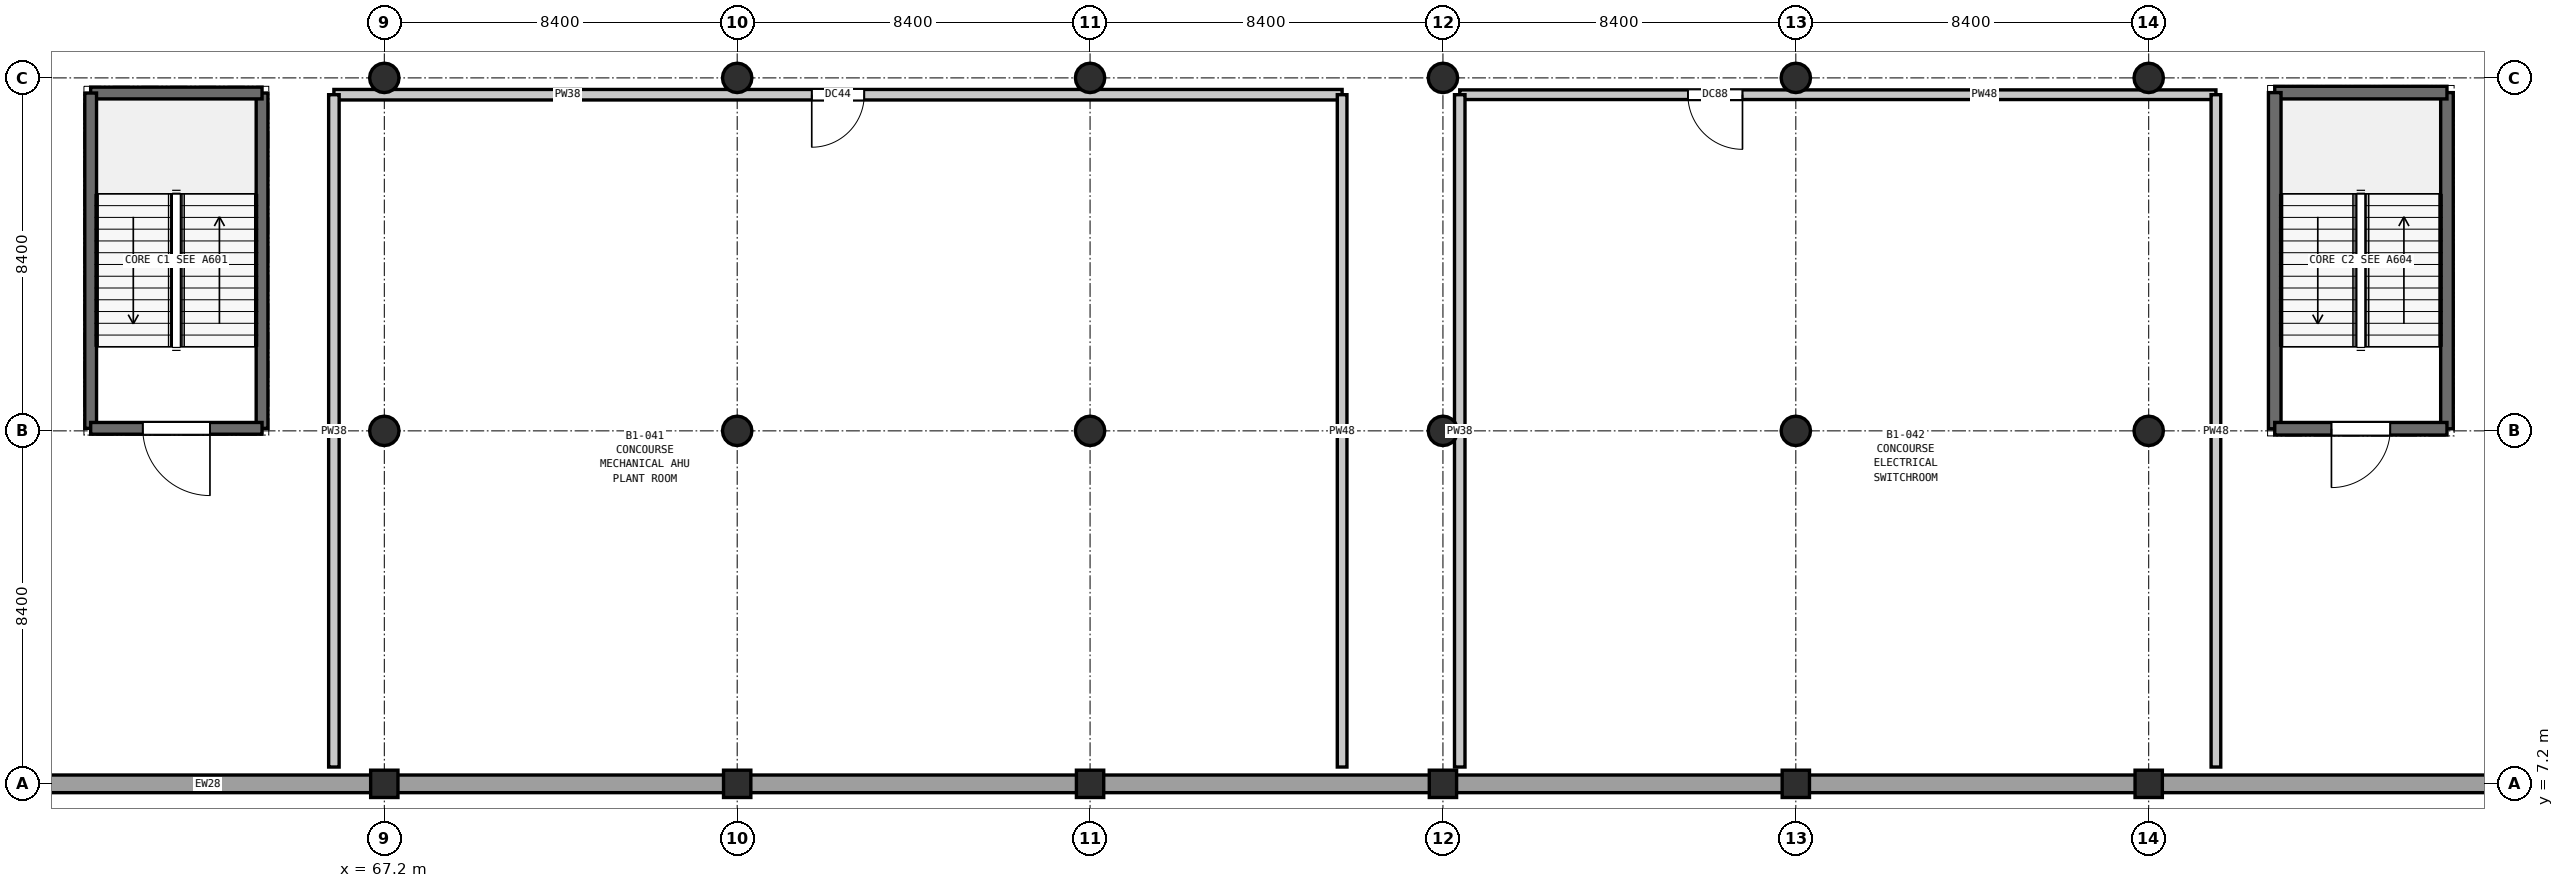
"""IFC4 building model, lengths in metres.
Left out: names, types, materials, properties, quantities, classifications, styles, units other than length and angle.
Written with IfcOpenShell. Run it as: python <this file> out.ifc"""

import sys

from ifc_helpers import new_model, si_unit, direction, frame, frame_2d, origin, origin_2d, place, context, subcontext, project, spatial, rectangle, circle, extrude, element, fill, save


model = new_model("IFC4")
c1 = context("Model", 3, precision=1e-05, world=origin(), true_north=direction((0.0, 1.0)))
c2 = subcontext(c1, "Body", "Model", "MODEL_VIEW")
j1 = project(units=[si_unit("LENGTHUNIT", "METRE"), si_unit("PLANEANGLEUNIT", "RADIAN")], contexts=[c1])
p1 = place(None, origin())
s1 = spatial("IfcSite", under=j1, at=p1, CompositionType="ELEMENT")
p2 = place(p1, origin())
s2 = spatial("IfcBuilding", under=s1, at=p2, CompositionType="ELEMENT")
p3 = place(p2, frame((0.0, 0.0, -4.8)))
s3 = spatial("IfcBuildingStorey", under=s2, at=p3, CompositionType="ELEMENT", Elevation=-4.8)
p4 = place(p3, frame((67.2, 7.2, 0.0), z_axis=(0.0, 0.0, 1.0), x_axis=(1.0, 0.0, 0.0)))
e1 = element("IfcColumn", 1, at=p4, inside=s3, PredefinedType="COLUMN", context=c2, shape_type="SweptSolid", body=[
    extrude(rectangle(XDim=0.65, YDim=0.65, at=origin_2d()), origin(), (0.0, 0.0, 1.0), 4.8),
])
for number, where, z_axis, x_axis in (
    (2, (67.2, 15.6, 0.0), (0.0, 0.0, 1.0), (1.0, 0.0, 0.0)),
    (3, (67.2, 24.0, 0.0), (0.0, 0.0, 1.0), (1.0, 0.0, 0.0)),
):
    element("IfcColumn", number, at=place(p3, frame(where, z_axis=z_axis, x_axis=x_axis)), inside=s3, PredefinedType="COLUMN", context=c2, shape_type="SweptSolid", body=[
        extrude(circle(Radius=0.35, at=origin_2d()), origin(), (0.0, 0.0, 1.0), 4.8),
    ])
p5 = place(p3, frame((75.6, 7.2, 0.0), z_axis=(0.0, 0.0, 1.0), x_axis=(1.0, 0.0, 0.0)))
e4 = element("IfcColumn", 4, at=p5, inside=s3, PredefinedType="COLUMN", context=c2, shape_type="SweptSolid", body=[
    extrude(rectangle(XDim=0.65, YDim=0.65, at=origin_2d()), origin(), (0.0, 0.0, 1.0), 4.8),
])
for number, where, z_axis, x_axis in (
    (5, (75.6, 15.6, 0.0), (0.0, 0.0, 1.0), (1.0, 0.0, 0.0)),
    (6, (75.6, 24.0, 0.0), (0.0, 0.0, 1.0), (1.0, 0.0, 0.0)),
):
    element("IfcColumn", number, at=place(p3, frame(where, z_axis=z_axis, x_axis=x_axis)), inside=s3, PredefinedType="COLUMN", context=c2, shape_type="SweptSolid", body=[
        extrude(circle(Radius=0.35, at=origin_2d()), origin(), (0.0, 0.0, 1.0), 4.8),
    ])
p6 = place(p3, frame((84.0, 7.2, 0.0), z_axis=(0.0, 0.0, 1.0), x_axis=(1.0, 0.0, 0.0)))
e7 = element("IfcColumn", 7, at=p6, inside=s3, PredefinedType="COLUMN", context=c2, shape_type="SweptSolid", body=[
    extrude(rectangle(XDim=0.65, YDim=0.65, at=origin_2d()), origin(), (0.0, 0.0, 1.0), 4.8),
])
for number, where, z_axis, x_axis in (
    (8, (84.0, 15.6, 0.0), (0.0, 0.0, 1.0), (1.0, 0.0, 0.0)),
    (9, (84.0, 24.0, 0.0), (0.0, 0.0, 1.0), (1.0, 0.0, 0.0)),
):
    element("IfcColumn", number, at=place(p3, frame(where, z_axis=z_axis, x_axis=x_axis)), inside=s3, PredefinedType="COLUMN", context=c2, shape_type="SweptSolid", body=[
        extrude(circle(Radius=0.35, at=origin_2d()), origin(), (0.0, 0.0, 1.0), 4.8),
    ])
p7 = place(p3, frame((92.4, 7.2, 0.0), z_axis=(0.0, 0.0, 1.0), x_axis=(1.0, 0.0, 0.0)))
e10 = element("IfcColumn", 10, at=p7, inside=s3, PredefinedType="COLUMN", context=c2, shape_type="SweptSolid", body=[
    extrude(rectangle(XDim=0.65, YDim=0.65, at=origin_2d()), origin(), (0.0, 0.0, 1.0), 4.8),
])
for number, where, z_axis, x_axis in (
    (11, (92.4, 15.6, 0.0), (0.0, 0.0, 1.0), (1.0, 0.0, 0.0)),
    (12, (92.4, 24.0, 0.0), (0.0, 0.0, 1.0), (1.0, 0.0, 0.0)),
):
    element("IfcColumn", number, at=place(p3, frame(where, z_axis=z_axis, x_axis=x_axis)), inside=s3, PredefinedType="COLUMN", context=c2, shape_type="SweptSolid", body=[
        extrude(circle(Radius=0.35, at=origin_2d()), origin(), (0.0, 0.0, 1.0), 4.8),
    ])
p8 = place(p3, frame((100.8, 7.2, 0.0), z_axis=(0.0, 0.0, 1.0), x_axis=(1.0, 0.0, 0.0)))
e13 = element("IfcColumn", 13, at=p8, inside=s3, PredefinedType="COLUMN", context=c2, shape_type="SweptSolid", body=[
    extrude(rectangle(XDim=0.65, YDim=0.65, at=origin_2d()), origin(), (0.0, 0.0, 1.0), 4.8),
])
for number, where, z_axis, x_axis in (
    (14, (100.8, 15.6, 0.0), (0.0, 0.0, 1.0), (1.0, 0.0, 0.0)),
    (15, (100.8, 24.0, 0.0), (0.0, 0.0, 1.0), (1.0, 0.0, 0.0)),
):
    element("IfcColumn", number, at=place(p3, frame(where, z_axis=z_axis, x_axis=x_axis)), inside=s3, PredefinedType="COLUMN", context=c2, shape_type="SweptSolid", body=[
        extrude(circle(Radius=0.35, at=origin_2d()), origin(), (0.0, 0.0, 1.0), 4.8),
    ])
p9 = place(p3, frame((109.2, 7.2, 0.0), z_axis=(0.0, 0.0, 1.0), x_axis=(1.0, 0.0, 0.0)))
e16 = element("IfcColumn", 16, at=p9, inside=s3, PredefinedType="COLUMN", context=c2, shape_type="SweptSolid", body=[
    extrude(rectangle(XDim=0.65, YDim=0.65, at=origin_2d()), origin(), (0.0, 0.0, 1.0), 4.8),
])
for number, where, z_axis, x_axis in (
    (17, (109.2, 15.6, 0.0), (0.0, 0.0, 1.0), (1.0, 0.0, 0.0)),
    (18, (109.2, 24.0, 0.0), (0.0, 0.0, 1.0), (1.0, 0.0, 0.0)),
):
    element("IfcColumn", number, at=place(p3, frame(where, z_axis=z_axis, x_axis=x_axis)), inside=s3, PredefinedType="COLUMN", context=c2, shape_type="SweptSolid", body=[
        extrude(circle(Radius=0.35, at=origin_2d()), origin(), (0.0, 0.0, 1.0), 4.8),
    ])
p10 = place(p3, frame((117.6, 7.2, 0.0), z_axis=(0.0, 0.0, 1.0), x_axis=(-1.0, 0.0, 0.0)))
e19 = element("IfcWall", 19, at=p10, inside=s3, PredefinedType="SOLIDWALL", context=c2, shape_type="SweptSolid", body=[
    extrude(rectangle(XDim=8.4, YDim=0.42, at=frame_2d((4.2, 0.0))), origin(), (0.0, 0.0, 1.0), 4.05),
])
p11 = place(p3, frame((109.2, 7.2, 0.0), z_axis=(0.0, 0.0, 1.0), x_axis=(-1.0, 0.0, 0.0)))
e20 = element("IfcWall", 20, at=p11, inside=s3, PredefinedType="SOLIDWALL", context=c2, shape_type="SweptSolid", body=[
    extrude(rectangle(XDim=8.4, YDim=0.42, at=frame_2d((4.2, 0.0))), origin(), (0.0, 0.0, 1.0), 4.05),
])
p12 = place(p3, frame((100.8, 7.2, 0.0), z_axis=(0.0, 0.0, 1.0), x_axis=(-1.0, 0.0, 0.0)))
e21 = element("IfcWall", 21, at=p12, inside=s3, PredefinedType="SOLIDWALL", context=c2, shape_type="SweptSolid", body=[
    extrude(rectangle(XDim=8.4, YDim=0.42, at=frame_2d((4.2, 0.0))), origin(), (0.0, 0.0, 1.0), 4.05),
])
for number, where, z_axis, x_axis in (
    (22, (92.4, 7.2, 0.0), (0.0, 0.0, 1.0), (-1.0, 0.0, 0.0)),
    (23, (84.0, 7.2, 0.0), (0.0, 0.0, 1.0), (-1.0, 0.0, 0.0)),
):
    element("IfcWall", number, at=place(p3, frame(where, z_axis=z_axis, x_axis=x_axis)), inside=s3, PredefinedType="SOLIDWALL", context=c2, shape_type="SweptSolid", body=[
        extrude(rectangle(XDim=8.4, YDim=0.42, at=frame_2d((4.2, 0.0))), origin(), (0.0, 0.0, 1.0), 4.05),
    ])
p13 = place(p3, frame((75.6, 7.2, 0.0), z_axis=(0.0, 0.0, 1.0), x_axis=(-1.0, 0.0, 0.0)))
e24 = element("IfcWall", 24, at=p13, inside=s3, PredefinedType="SOLIDWALL", context=c2, shape_type="SweptSolid", body=[
    extrude(rectangle(XDim=8.4, YDim=0.42, at=frame_2d((4.2, 0.0))), origin(), (0.0, 0.0, 1.0), 4.05),
])
p14 = place(p3, frame((67.2, 7.2, 0.0), z_axis=(0.0, 0.0, 1.0), x_axis=(-1.0, 0.0, 0.0)))
e25 = element("IfcWall", 25, at=p14, inside=s3, PredefinedType="SOLIDWALL", context=c2, shape_type="SweptSolid", body=[
    extrude(rectangle(XDim=8.4, YDim=0.42, at=frame_2d((4.2, 0.0))), origin(), (0.0, 0.0, 1.0), 4.05),
])
p15 = place(p3, frame((64.29, 15.66, 0.0), z_axis=(0.0, 0.0, 1.0), x_axis=(0.0, 1.0, 0.0)))
e26 = element("IfcWall", 26, at=p15, inside=s3, PredefinedType="SHEAR", context=c2, shape_type="SweptSolid", body=[
    extrude(rectangle(XDim=7.98, YDim=0.28, at=frame_2d((3.99, 0.0))), origin(), (0.0, 0.0, 1.0), 4.8),
])
p16 = place(p3, frame((64.29, 23.64, 0.0), z_axis=(0.0, 0.0, 1.0), x_axis=(-1.0, 0.0, 0.0)))
e27 = element("IfcWall", 27, at=p16, inside=s3, PredefinedType="SHEAR", context=c2, shape_type="SweptSolid", body=[
    extrude(rectangle(XDim=4.08, YDim=0.28, at=frame_2d((2.04, 0.0))), origin(), (0.0, 0.0, 1.0), 4.8),
])
p17 = place(p3, frame((60.21, 23.64, 0.0), z_axis=(0.0, 0.0, 1.0), x_axis=(0.0, -1.0, 0.0)))
e28 = element("IfcWall", 28, at=p17, inside=s3, PredefinedType="SHEAR", context=c2, shape_type="SweptSolid", body=[
    extrude(rectangle(XDim=7.98, YDim=0.28, at=frame_2d((3.99, 0.0))), origin(), (0.0, 0.0, 1.0), 4.8),
])
p18 = place(p3, frame((60.21, 15.66, 0.0), z_axis=(0.0, 0.0, 1.0), x_axis=(1.0, 0.0, 0.0)))
e29 = element("IfcWall", 29, at=p18, inside=s3, PredefinedType="SHEAR", context=c2, shape_type="SweptSolid", body=[
    extrude(rectangle(XDim=4.08, YDim=0.28, at=frame_2d((2.04, 0.0))), origin(), (0.0, 0.0, 1.0), 4.8),
])
p19 = place(p18, frame((1.24, 0.0, 0.0)))
e30 = element("IfcOpeningElement", 30, at=p19, cuts=e29, PredefinedType="OPENING", context=c2, shape_type="SweptSolid", body=[
    extrude(rectangle(XDim=1.6, YDim=2.25, at=frame_2d((0.8, 1.125))), frame((0.0, 0.15, 0.0), z_axis=(0.0, -1.0, 0.0), x_axis=(1.0, 0.0, 0.0)), (0.0, 0.0, 1.0), 0.3),
])
p20 = place(p3, frame((116.3, 15.65, 0.0), z_axis=(0.0, 0.0, 1.0), x_axis=(0.0, 1.0, 0.0)))
e31 = element("IfcWall", 31, at=p20, inside=s3, PredefinedType="SHEAR", context=c2, shape_type="SweptSolid", body=[
    extrude(rectangle(XDim=8.0, YDim=0.3, at=frame_2d((4.0, 0.0))), origin(), (0.0, 0.0, 1.0), 4.8),
])
p21 = place(p3, frame((116.3, 23.65, 0.0), z_axis=(0.0, 0.0, 1.0), x_axis=(-1.0, 0.0, 0.0)))
e32 = element("IfcWall", 32, at=p21, inside=s3, PredefinedType="SHEAR", context=c2, shape_type="SweptSolid", body=[
    extrude(rectangle(XDim=4.1, YDim=0.3, at=frame_2d((2.05, 0.0))), origin(), (0.0, 0.0, 1.0), 4.8),
])
p22 = place(p3, frame((112.2, 23.65, 0.0), z_axis=(0.0, 0.0, 1.0), x_axis=(0.0, -1.0, 0.0)))
e33 = element("IfcWall", 33, at=p22, inside=s3, PredefinedType="SHEAR", context=c2, shape_type="SweptSolid", body=[
    extrude(rectangle(XDim=8.0, YDim=0.3, at=frame_2d((4.0, 0.0))), origin(), (0.0, 0.0, 1.0), 4.8),
])
p23 = place(p3, frame((112.2, 15.65, 0.0), z_axis=(0.0, 0.0, 1.0), x_axis=(1.0, 0.0, 0.0)))
e34 = element("IfcWall", 34, at=p23, inside=s3, PredefinedType="SHEAR", context=c2, shape_type="SweptSolid", body=[
    extrude(rectangle(XDim=4.1, YDim=0.3, at=frame_2d((2.05, 0.0))), origin(), (0.0, 0.0, 1.0), 4.8),
])
p24 = place(p23, frame((1.35, 0.0, 0.0)))
e35 = element("IfcOpeningElement", 35, at=p24, cuts=e34, PredefinedType="OPENING", context=c2, shape_type="SweptSolid", body=[
    extrude(rectangle(XDim=1.4, YDim=2.2, at=frame_2d((0.7, 1.1))), frame((0.0, 0.16, 0.0), z_axis=(0.0, -1.0, 0.0), x_axis=(1.0, 0.0, 0.0)), (0.0, 0.0, 1.0), 0.32),
])
p25 = place(p3, frame((66.0, 23.6, 0.0), z_axis=(0.0, 0.0, 1.0), x_axis=(1.0, 0.0, 0.0)))
e36 = element("IfcWall", 36, at=p25, inside=s3, PredefinedType="PARTITIONING", context=c2, shape_type="SweptSolid", body=[
    extrude(rectangle(XDim=24.0, YDim=0.25, at=frame_2d((12.0, 0.0))), origin(), (0.0, 0.0, 1.0), 4.44),
])
p26 = place(p25, frame((11.375, 0.0, 0.0)))
e37 = element("IfcOpeningElement", 37, at=p26, cuts=e36, PredefinedType="OPENING", context=c2, shape_type="SweptSolid", body=[
    extrude(rectangle(XDim=1.25, YDim=2.15, at=frame_2d((0.625, 1.075))), frame((0.0, 0.135, 0.0), z_axis=(0.0, -1.0, 0.0), x_axis=(1.0, 0.0, 0.0)), (0.0, 0.0, 1.0), 0.27),
])
p27 = place(p3, frame((92.8, 23.6, 0.0), z_axis=(0.0, 0.0, 1.0), x_axis=(1.0, 0.0, 0.0)))
e38 = element("IfcWall", 38, at=p27, inside=s3, PredefinedType="PARTITIONING", context=c2, shape_type="SweptSolid", body=[
    extrude(rectangle(XDim=18.0, YDim=0.23, at=frame_2d((9.0, 0.0))), origin(), (0.0, 0.0, 1.0), 4.44),
])
p28 = place(p27, frame((5.43, 0.0, 0.0)))
e39 = element("IfcOpeningElement", 39, at=p28, cuts=e38, PredefinedType="OPENING", context=c2, shape_type="SweptSolid", body=[
    extrude(rectangle(XDim=1.3, YDim=2.2, at=frame_2d((0.65, 1.1))), frame((0.0, 0.125, 0.0), z_axis=(0.0, -1.0, 0.0), x_axis=(1.0, 0.0, 0.0)), (0.0, 0.0, 1.0), 0.25),
])
p29 = place(p3, frame((66.0, 7.6, 0.0), z_axis=(0.0, 0.0, 1.0), x_axis=(0.0, 1.0, 0.0)))
e40 = element("IfcWall", 40, at=p29, inside=s3, PredefinedType="PARTITIONING", context=c2, shape_type="SweptSolid", body=[
    extrude(rectangle(XDim=16.0, YDim=0.25, at=frame_2d((8.0, 0.0))), origin(), (0.0, 0.0, 1.0), 4.44),
])
p30 = place(p3, frame((90.0, 7.6, 0.0), z_axis=(0.0, 0.0, 1.0), x_axis=(0.0, 1.0, 0.0)))
e41 = element("IfcWall", 41, at=p30, inside=s3, PredefinedType="PARTITIONING", context=c2, shape_type="SweptSolid", body=[
    extrude(rectangle(XDim=16.0, YDim=0.23, at=frame_2d((8.0, 0.0))), origin(), (0.0, 0.0, 1.0), 4.44),
])
p31 = place(p3, frame((92.8, 7.6, 0.0), z_axis=(0.0, 0.0, 1.0), x_axis=(0.0, 1.0, 0.0)))
e42 = element("IfcWall", 42, at=p31, inside=s3, PredefinedType="PARTITIONING", context=c2, shape_type="SweptSolid", body=[
    extrude(rectangle(XDim=16.0, YDim=0.25, at=frame_2d((8.0, 0.0))), origin(), (0.0, 0.0, 1.0), 4.44),
])
p32 = place(p3, frame((110.8, 7.6, 0.0), z_axis=(0.0, 0.0, 1.0), x_axis=(0.0, 1.0, 0.0)))
e43 = element("IfcWall", 43, at=p32, inside=s3, PredefinedType="PARTITIONING", context=c2, shape_type="SweptSolid", body=[
    extrude(rectangle(XDim=16.0, YDim=0.23, at=frame_2d((8.0, 0.0))), origin(), (0.0, 0.0, 1.0), 4.44),
])
p33 = place(p19, frame((1.6, 0.0, 0.0), z_axis=(0.0, 0.0, 1.0), x_axis=(-1.0, 0.0, 0.0)))
e44 = element("IfcDoor", 44, at=p33, inside=s3, OperationType="SINGLE_SWING_LEFT", PredefinedType="DOOR", context=c2, shape_type="SweptSolid", body=[
    extrude(rectangle(XDim=1.6, YDim=2.25, at=frame_2d((0.8, 1.125))), frame((0.0, 0.025, 0.0), z_axis=(0.0, -1.0, 0.0), x_axis=(1.0, 0.0, 0.0)), (0.0, 0.0, 1.0), 0.05),
])
fill(e30, e44)
p34 = place(p24, frame((1.4, 0.0, 0.0), z_axis=(0.0, 0.0, 1.0), x_axis=(-1.0, 0.0, 0.0)))
e45 = element("IfcDoor", 45, at=p34, inside=s3, OperationType="SINGLE_SWING_RIGHT", PredefinedType="DOOR", context=c2, shape_type="SweptSolid", body=[
    extrude(rectangle(XDim=1.4, YDim=2.2, at=frame_2d((0.7, 1.1))), frame((0.0, 0.025, 0.0), z_axis=(0.0, -1.0, 0.0), x_axis=(1.0, 0.0, 0.0)), (0.0, 0.0, 1.0), 0.05),
])
fill(e35, e45)
p35 = place(p26, frame((1.25, 0.0, 0.0), z_axis=(0.0, 0.0, 1.0), x_axis=(-1.0, 0.0, 0.0)))
e46 = element("IfcDoor", 46, at=p35, inside=s3, OperationType="SINGLE_SWING_RIGHT", PredefinedType="DOOR", context=c2, shape_type="SweptSolid", body=[
    extrude(rectangle(XDim=1.25, YDim=2.15, at=frame_2d((0.625, 1.075))), frame((0.0, 0.025, 0.0), z_axis=(0.0, -1.0, 0.0), x_axis=(1.0, 0.0, 0.0)), (0.0, 0.0, 1.0), 0.05),
])
fill(e37, e46)
p36 = place(p28, frame((1.3, 0.0, 0.0), z_axis=(0.0, 0.0, 1.0), x_axis=(-1.0, 0.0, 0.0)))
e47 = element("IfcDoor", 47, at=p36, inside=s3, OperationType="SINGLE_SWING_LEFT", PredefinedType="DOOR", context=c2, shape_type="SweptSolid", body=[
    extrude(rectangle(XDim=1.3, YDim=2.2, at=frame_2d((0.65, 1.1))), frame((0.0, 0.025, 0.0), z_axis=(0.0, -1.0, 0.0), x_axis=(1.0, 0.0, 0.0)), (0.0, 0.0, 1.0), 0.05),
])
fill(e39, e47)
save(model, sys.argv[1])
